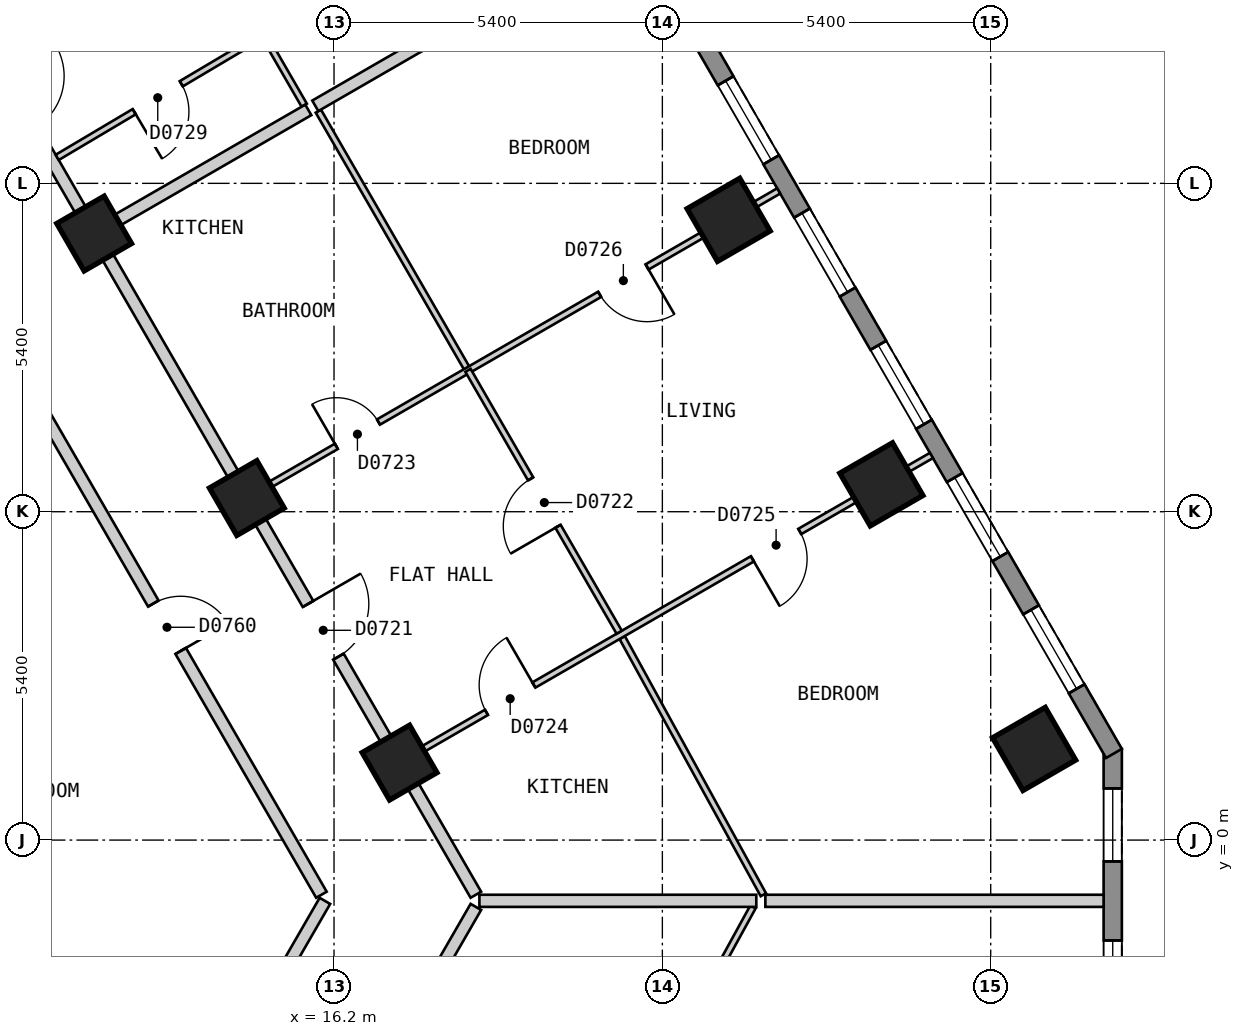
"""IFC4 building model, lengths in metres.
Left out: names, types, materials, properties, quantities, classifications, styles, units other than length and angle.
Written with IfcOpenShell. Run it as: python <this file> out.ifc"""

import sys

from ifc_helpers import new_model, si_unit, direction, frame, frame_2d, origin, origin_2d, place, context, subcontext, project, spatial, polyline, rectangle, outline, extrude, element, fill, save


model = new_model("IFC4")
c1 = context("Model", 3, precision=1e-05, world=origin(), true_north=direction((0.0, 1.0)))
c2 = subcontext(c1, "Body", "Model", "MODEL_VIEW")
j1 = project(units=[si_unit("LENGTHUNIT", "METRE"), si_unit("PLANEANGLEUNIT", "RADIAN")], contexts=[c1])
p1 = place(None, origin())
s1 = spatial("IfcSite", under=j1, at=p1, CompositionType="ELEMENT")
p2 = place(p1, origin())
s2 = spatial("IfcBuilding", under=s1, at=p2, CompositionType="ELEMENT")
p3 = place(p2, frame((0.0, 0.0, 93.0)))
s3 = spatial("IfcBuildingStorey", under=s2, at=p3, CompositionType="ELEMENT", Elevation=93.0)
for number, where, z_axis, x_axis in (
    (1, (27.714, 1.499, 0.0), (0.0, 0.0, 1.0), (-0.5, 0.866, 0.0)),
    (2, (25.202, 5.85, 0.0), (0.0, 0.0, 1.0), (-0.5, 0.866, 0.0)),
    (3, (22.69, 10.2, 0.0), (0.0, 0.0, 1.0), (-0.5, 0.866, 0.0)),
):
    element("IfcColumn", number, at=place(p3, frame(where, z_axis=z_axis, x_axis=x_axis)), inside=s3, PredefinedType="COLUMN", context=c2, shape_type="SweptSolid", body=[
        extrude(rectangle(XDim=1.0, YDim=1.0, at=origin_2d()), origin(), (0.0, 0.0, 1.0), 3.0),
    ])
for number, where, z_axis, x_axis in (
    (4, (17.278, 1.274, 0.0), (0.0, 0.0, 1.0), (-0.5, 0.866, 0.0)),
    (5, (14.766, 5.625, 0.0), (0.0, 0.0, 1.0), (-0.5, 0.866, 0.0)),
    (6, (12.255, 9.975, 0.0), (0.0, 0.0, 1.0), (-0.5, 0.866, 0.0)),
):
    element("IfcColumn", number, at=place(p3, frame(where, z_axis=z_axis, x_axis=x_axis)), inside=s3, PredefinedType="COLUMN", context=c2, shape_type="SweptSolid", body=[
        extrude(rectangle(XDim=0.9, YDim=0.9, at=origin_2d()), origin(), (0.0, 0.0, 1.0), 3.0),
    ])
p4 = place(p3, frame((29.007, -3.5, 0.0), z_axis=(0.0, 0.0, 1.0), x_axis=(0.0, 1.0, 0.0)))
e7 = element("IfcWall", 7, at=p4, inside=s3, PredefinedType="SOLIDWALL", context=c2, shape_type="SweptSolid", body=[
    extrude(outline(polyline([(0.0, -0.15), (5.0, -0.15), (4.92, 0.15), (0.08, 0.15), (0.0, -0.15)])), origin(), (0.0, 0.0, 1.0), 2.7),
])
p5 = place(p4, frame((0.65, 0.0, 0.15)))
e8 = element("IfcOpeningElement", 8, at=p5, cuts=e7, PredefinedType="OPENING", context=c2, shape_type="SweptSolid", body=[
    extrude(rectangle(XDim=1.2, YDim=2.1, at=frame_2d((0.6, 1.05))), frame((0.0, 0.16, 0.0), z_axis=(0.0, -1.0, 0.0), x_axis=(1.0, 0.0, 0.0)), (0.0, 0.0, 1.0), 0.32),
])
p6 = place(p4, frame((3.15, 0.0, 0.15)))
e9 = element("IfcOpeningElement", 9, at=p6, cuts=e7, PredefinedType="OPENING", context=c2, shape_type="SweptSolid", body=[
    extrude(rectangle(XDim=1.2, YDim=2.1, at=frame_2d((0.6, 1.05))), frame((0.0, 0.16, 0.0), z_axis=(0.0, -1.0, 0.0), x_axis=(1.0, 0.0, 0.0)), (0.0, 0.0, 1.0), 0.32),
])
p7 = place(p3, frame((29.027, 1.425, 0.0), z_axis=(0.0, 0.0, 1.0), x_axis=(-0.500027479704, 0.866009537788, 0.0)))
e10 = element("IfcWall", 10, at=p7, inside=s3, PredefinedType="SOLIDWALL", context=c2, shape_type="SweptSolid", body=[
    extrude(outline(polyline([(0.0, -0.15), (26.559, -0.15), (26.478, 0.15), (0.08, 0.15), (0.0, -0.15)])), origin(), (0.0, 0.0, 1.0), 2.7),
])
p8 = place(p7, frame((1.227, 0.0, 0.15)))
e11 = element("IfcOpeningElement", 11, at=p8, cuts=e10, PredefinedType="OPENING", context=c2, shape_type="SweptSolid", body=[
    extrude(rectangle(XDim=1.5, YDim=2.1, at=frame_2d((0.75, 1.05))), frame((0.0, 0.16, 0.0), z_axis=(0.0, -1.0, 0.0), x_axis=(1.0, 0.0, 0.0)), (0.0, 0.0, 1.0), 0.32),
])
p9 = place(p7, frame((3.738, 0.0, 0.15)))
e12 = element("IfcOpeningElement", 12, at=p9, cuts=e10, PredefinedType="OPENING", context=c2, shape_type="SweptSolid", body=[
    extrude(rectangle(XDim=1.5, YDim=2.1, at=frame_2d((0.75, 1.05))), frame((0.0, 0.16, 0.0), z_axis=(0.0, -1.0, 0.0), x_axis=(1.0, 0.0, 0.0)), (0.0, 0.0, 1.0), 0.32),
])
p10 = place(p7, frame((6.25, 0.0, 0.15)))
e13 = element("IfcOpeningElement", 13, at=p10, cuts=e10, PredefinedType="OPENING", context=c2, shape_type="SweptSolid", body=[
    extrude(rectangle(XDim=1.5, YDim=2.1, at=frame_2d((0.75, 1.05))), frame((0.0, 0.16, 0.0), z_axis=(0.0, -1.0, 0.0), x_axis=(1.0, 0.0, 0.0)), (0.0, 0.0, 1.0), 0.32),
])
p11 = place(p7, frame((8.761, 0.0, 0.15)))
e14 = element("IfcOpeningElement", 14, at=p11, cuts=e10, PredefinedType="OPENING", context=c2, shape_type="SweptSolid", body=[
    extrude(rectangle(XDim=1.5, YDim=2.1, at=frame_2d((0.75, 1.05))), frame((0.0, 0.16, 0.0), z_axis=(0.0, -1.0, 0.0), x_axis=(1.0, 0.0, 0.0)), (0.0, 0.0, 1.0), 0.32),
])
p12 = place(p7, frame((11.273, 0.0, 0.15)))
e15 = element("IfcOpeningElement", 15, at=p12, cuts=e10, PredefinedType="OPENING", context=c2, shape_type="SweptSolid", body=[
    extrude(rectangle(XDim=1.5, YDim=2.1, at=frame_2d((0.75, 1.05))), frame((0.0, 0.16, 0.0), z_axis=(0.0, -1.0, 0.0), x_axis=(1.0, 0.0, 0.0)), (0.0, 0.0, 1.0), 0.32),
])
p13 = place(p7, frame((13.785, 0.0, 0.15)))
e16 = element("IfcOpeningElement", 16, at=p13, cuts=e10, PredefinedType="OPENING", context=c2, shape_type="SweptSolid", body=[
    extrude(rectangle(XDim=1.5, YDim=2.1, at=frame_2d((0.75, 1.05))), frame((0.0, 0.16, 0.0), z_axis=(0.0, -1.0, 0.0), x_axis=(1.0, 0.0, 0.0)), (0.0, 0.0, 1.0), 0.32),
])
p14 = place(p7, frame((16.296, 0.0, 0.15)))
e17 = element("IfcOpeningElement", 17, at=p14, cuts=e10, PredefinedType="OPENING", context=c2, shape_type="SweptSolid", body=[
    extrude(rectangle(XDim=1.5, YDim=2.1, at=frame_2d((0.75, 1.05))), frame((0.0, 0.16, 0.0), z_axis=(0.0, -1.0, 0.0), x_axis=(1.0, 0.0, 0.0)), (0.0, 0.0, 1.0), 0.32),
])
p15 = place(p7, frame((18.807, 0.0, 0.15)))
e18 = element("IfcOpeningElement", 18, at=p15, cuts=e10, PredefinedType="OPENING", context=c2, shape_type="SweptSolid", body=[
    extrude(rectangle(XDim=1.5, YDim=2.1, at=frame_2d((0.75, 1.05))), frame((0.0, 0.16, 0.0), z_axis=(0.0, -1.0, 0.0), x_axis=(1.0, 0.0, 0.0)), (0.0, 0.0, 1.0), 0.32),
])
p16 = place(p7, frame((21.319, 0.0, 0.15)))
e19 = element("IfcOpeningElement", 19, at=p16, cuts=e10, PredefinedType="OPENING", context=c2, shape_type="SweptSolid", body=[
    extrude(rectangle(XDim=1.5, YDim=2.1, at=frame_2d((0.75, 1.05))), frame((0.0, 0.16, 0.0), z_axis=(0.0, -1.0, 0.0), x_axis=(1.0, 0.0, 0.0)), (0.0, 0.0, 1.0), 0.32),
])
p17 = place(p7, frame((23.831, 0.0, 0.15)))
e20 = element("IfcOpeningElement", 20, at=p17, cuts=e10, PredefinedType="OPENING", context=c2, shape_type="SweptSolid", body=[
    extrude(rectangle(XDim=1.5, YDim=2.1, at=frame_2d((0.75, 1.05))), frame((0.0, 0.16, 0.0), z_axis=(0.0, -1.0, 0.0), x_axis=(1.0, 0.0, 0.0)), (0.0, 0.0, 1.0), 0.32),
])
p18 = place(p3, frame((10.913, 7.899, 0.0), z_axis=(0.0, 0.0, 1.0), x_axis=(0.500028940566, -0.866008694296, 0.0)))
e21 = element("IfcWall", 21, at=p18, inside=s3, PredefinedType="PARTITIONING", context=c2, shape_type="SweptSolid", body=[
    extrude(rectangle(XDim=10.159, YDim=0.2, at=frame_2d((5.08, 0.0))), origin(), (0.0, 0.0, 1.0), 2.7),
])
p19 = place(p18, frame((4.63, 0.0, 0.0)))
e22 = element("IfcOpeningElement", 22, at=p19, cuts=e21, PredefinedType="OPENING", context=c2, shape_type="SweptSolid", body=[
    extrude(rectangle(XDim=0.9, YDim=2.1, at=frame_2d((0.45, 1.05))), frame((0.0, 0.11, 0.0), z_axis=(0.0, -1.0, 0.0), x_axis=(1.0, 0.0, 0.0)), (0.0, 0.0, 1.0), 0.22),
])
p20 = place(p3, frame((8.488, 16.5, 0.0), z_axis=(0.0, 0.0, 1.0), x_axis=(0.499986836607, -0.86603300354, 0.0)))
e23 = element("IfcWall", 23, at=p20, inside=s3, PredefinedType="PARTITIONING", context=c2, shape_type="SweptSolid", body=[
    extrude(rectangle(XDim=20.09, YDim=0.2, at=frame_2d((10.045, 0.0))), origin(), (0.0, 0.0, 1.0), 2.7),
])
p21 = place(p20, frame((14.569, 0.0, 0.0)))
e24 = element("IfcOpeningElement", 24, at=p21, cuts=e23, PredefinedType="OPENING", context=c2, shape_type="SweptSolid", body=[
    extrude(rectangle(XDim=1.0, YDim=2.1, at=frame_2d((0.5, 1.05))), frame((0.0, 0.11, 0.0), z_axis=(0.0, -1.0, 0.0), x_axis=(1.0, 0.0, 0.0)), (0.0, 0.0, 1.0), 0.22),
])
p22 = place(p20, frame((4.547, 0.0, 0.0)))
e25 = element("IfcOpeningElement", 25, at=p22, cuts=e23, PredefinedType="OPENING", context=c2, shape_type="SweptSolid", body=[
    extrude(rectangle(XDim=1.0, YDim=2.1, at=frame_2d((0.5, 1.05))), frame((0.0, 0.11, 0.0), z_axis=(0.0, -1.0, 0.0), x_axis=(1.0, 0.0, 0.0)), (0.0, 0.0, 1.0), 0.22),
])
p23 = place(p3, frame((15.011, -2.8, 0.0), z_axis=(0.0, 0.0, 1.0), x_axis=(0.499929208183, 0.866066271601, 0.0)))
e26 = element("IfcWall", 26, at=p23, inside=s3, PredefinedType="PARTITIONING", context=c2, shape_type="SweptSolid", body=[
    extrude(rectangle(XDim=2.078, YDim=0.2, at=frame_2d((1.039, 0.0))), origin(), (0.0, 0.0, 1.0), 2.7),
])
p24 = place(p3, frame((15.771, -5.884, 0.0), z_axis=(0.0, 0.0, 1.0), x_axis=(0.499917542299, 0.866073005526, 0.0)))
e27 = element("IfcWall", 27, at=p24, inside=s3, PredefinedType="PARTITIONING", context=c2, shape_type="SweptSolid", body=[
    extrude(rectangle(XDim=5.525, YDim=0.2, at=frame_2d((2.762, 0.0))), origin(), (0.0, 0.0, 1.0), 2.7),
])
p25 = place(p3, frame((13.273, 16.305, 0.0), z_axis=(0.0, 0.0, 1.0), x_axis=(0.500093956194, -0.865971151354, 0.0)))
e28 = element("IfcWall", 28, at=p25, inside=s3, PredefinedType="PARTITIONING", context=c2, shape_type="SweptSolid", body=[
    extrude(rectangle(XDim=4.873, YDim=0.1, at=frame_2d((2.437, 0.0))), origin(), (0.0, 0.0, 1.0), 2.7),
])
p26 = place(p25, frame((1.987, 0.0, 0.0)))
e29 = element("IfcOpeningElement", 29, at=p26, cuts=e28, PredefinedType="OPENING", context=c2, shape_type="SweptSolid", body=[
    extrude(rectangle(XDim=0.9, YDim=2.1, at=frame_2d((0.45, 1.05))), frame((0.0, 0.06, 0.0), z_axis=(0.0, -1.0, 0.0), x_axis=(1.0, 0.0, 0.0)), (0.0, 0.0, 1.0), 0.12),
])
p27 = place(p3, frame((15.942, 11.988, 0.0), z_axis=(0.0, 0.0, 1.0), x_axis=(0.499995794706, -0.866027831699, 0.0)))
e30 = element("IfcWall", 30, at=p27, inside=s3, PredefinedType="PARTITIONING", context=c2, shape_type="SweptSolid", body=[
    extrude(rectangle(XDim=4.922, YDim=0.1, at=frame_2d((2.461, 0.0))), origin(), (0.0, 0.0, 1.0), 2.7),
])
p28 = place(p3, frame((20.939, 3.331, 0.0), z_axis=(0.0, 0.0, 1.0), x_axis=(0.481207738216, -0.876606589458, 0.0)))
e31 = element("IfcWall", 31, at=p28, inside=s3, PredefinedType="PARTITIONING", context=c2, shape_type="SweptSolid", body=[
    extrude(rectangle(XDim=4.825, YDim=0.1, at=frame_2d((2.413, 0.0))), origin(), (0.0, 0.0, 1.0), 2.7),
])
p29 = place(p3, frame((20.812, -5.248, 0.0), z_axis=(0.0, 0.0, 1.0), x_axis=(0.481296891345, 0.876557643502, 0.0)))
e32 = element("IfcWall", 32, at=p29, inside=s3, PredefinedType="PARTITIONING", context=c2, shape_type="SweptSolid", body=[
    extrude(rectangle(XDim=4.733, YDim=0.1, at=frame_2d((2.367, 0.0))), origin(), (0.0, 0.0, 1.0), 2.7),
])
p30 = place(p3, frame((17.365, 1.325, 0.0), z_axis=(0.0, 0.0, 1.0), x_axis=(0.866016855193, 0.500014806302, 0.0)))
e33 = element("IfcWall", 33, at=p30, inside=s3, PredefinedType="PARTITIONING", context=c2, shape_type="SweptSolid", body=[
    extrude(rectangle(XDim=10.0, YDim=0.1, at=frame_2d((5.0, 0.0))), origin(), (0.0, 0.0, 1.0), 2.7),
])
p31 = place(p30, frame((1.55, 0.0, 0.0)))
e34 = element("IfcOpeningElement", 34, at=p31, cuts=e33, PredefinedType="OPENING", context=c2, shape_type="SweptSolid", body=[
    extrude(rectangle(XDim=0.9, YDim=2.1, at=frame_2d((0.45, 1.05))), frame((0.0, 0.06, 0.0), z_axis=(0.0, -1.0, 0.0), x_axis=(1.0, 0.0, 0.0)), (0.0, 0.0, 1.0), 0.12),
])
p32 = place(p30, frame((6.6, 0.0, 0.0)))
e35 = element("IfcOpeningElement", 35, at=p32, cuts=e33, PredefinedType="OPENING", context=c2, shape_type="SweptSolid", body=[
    extrude(rectangle(XDim=0.9, YDim=2.1, at=frame_2d((0.45, 1.05))), frame((0.0, 0.06, 0.0), z_axis=(0.0, -1.0, 0.0), x_axis=(1.0, 0.0, 0.0)), (0.0, 0.0, 1.0), 0.12),
])
p33 = place(p3, frame((14.853, 5.675, 0.0), z_axis=(0.0, 0.0, 1.0), x_axis=(0.866016855193, 0.500014806302, 0.0)))
e36 = element("IfcWall", 36, at=p33, inside=s3, PredefinedType="PARTITIONING", context=c2, shape_type="SweptSolid", body=[
    extrude(rectangle(XDim=10.0, YDim=0.1, at=frame_2d((5.0, 0.0))), origin(), (0.0, 0.0, 1.0), 2.7),
])
p34 = place(p33, frame((1.6, 0.0, 0.0)))
e37 = element("IfcOpeningElement", 37, at=p34, cuts=e36, PredefinedType="OPENING", context=c2, shape_type="SweptSolid", body=[
    extrude(rectangle(XDim=0.8, YDim=2.1, at=frame_2d((0.4, 1.05))), frame((0.0, 0.06, 0.0), z_axis=(0.0, -1.0, 0.0), x_axis=(1.0, 0.0, 0.0)), (0.0, 0.0, 1.0), 0.12),
])
p35 = place(p33, frame((6.6, 0.0, 0.0)))
e38 = element("IfcOpeningElement", 38, at=p35, cuts=e36, PredefinedType="OPENING", context=c2, shape_type="SweptSolid", body=[
    extrude(rectangle(XDim=0.9, YDim=2.1, at=frame_2d((0.45, 1.05))), frame((0.0, 0.06, 0.0), z_axis=(0.0, -1.0, 0.0), x_axis=(1.0, 0.0, 0.0)), (0.0, 0.0, 1.0), 0.12),
])
p36 = place(p3, frame((11.647, 11.227, 0.0), z_axis=(0.0, 0.0, 1.0), x_axis=(0.859997349349, 0.510298500011, 0.0)))
e39 = element("IfcWall", 39, at=p36, inside=s3, PredefinedType="PARTITIONING", context=c2, shape_type="SweptSolid", body=[
    extrude(rectangle(XDim=3.898, YDim=0.1, at=frame_2d((1.949, 0.0))), origin(), (0.0, 0.0, 1.0), 2.7),
])
p37 = place(p36, frame((1.473, 0.0, 0.0)))
e40 = element("IfcOpeningElement", 40, at=p37, cuts=e39, PredefinedType="OPENING", context=c2, shape_type="SweptSolid", body=[
    extrude(rectangle(XDim=0.9, YDim=2.1, at=frame_2d((0.45, 1.05))), frame((0.0, 0.06, 0.0), z_axis=(0.0, -1.0, 0.0), x_axis=(1.0, 0.0, 0.0)), (0.0, 0.0, 1.0), 0.12),
])
p38 = place(p3, frame((18.591, -0.999, 0.0), z_axis=(0.0, 0.0, 1.0), x_axis=(1.0, 0.0, 0.0)))
e41 = element("IfcWall", 41, at=p38, inside=s3, PredefinedType="PARTITIONING", context=c2, shape_type="SweptSolid", body=[
    extrude(rectangle(XDim=4.554, YDim=0.2, at=frame_2d((2.277, 0.0))), origin(), (0.0, 0.0, 1.0), 2.7),
])
p39 = place(p3, frame((23.294, -0.999, 0.0), z_axis=(0.0, 0.0, 1.0), x_axis=(1.0, 0.0, 0.0)))
e42 = element("IfcWall", 42, at=p39, inside=s3, PredefinedType="PARTITIONING", context=c2, shape_type="SweptSolid", body=[
    extrude(rectangle(XDim=5.563, YDim=0.2, at=frame_2d((2.781, 0.0))), origin(), (0.0, 0.0, 1.0), 2.7),
])
p40 = place(p3, frame((12.342, 10.025, 0.0), z_axis=(0.0, 0.0, 1.0), x_axis=(0.866033886885, 0.499985306551, 0.0)))
e43 = element("IfcWall", 43, at=p40, inside=s3, PredefinedType="PARTITIONING", context=c2, shape_type="SweptSolid", body=[
    extrude(rectangle(XDim=3.966, YDim=0.2, at=frame_2d((1.983, 0.0))), origin(), (0.0, 0.0, 1.0), 2.7),
])
p41 = place(p3, frame((15.892, 12.075, 0.0), z_axis=(0.0, 0.0, 1.0), x_axis=(0.866000883696, 0.500042467634, 0.0)))
e44 = element("IfcWall", 44, at=p41, inside=s3, PredefinedType="PARTITIONING", context=c2, shape_type="SweptSolid", body=[
    extrude(rectangle(XDim=5.899, YDim=0.2, at=frame_2d((2.95, 0.0))), origin(), (0.0, 0.0, 1.0), 2.7),
])
p42 = place(p3, frame((18.403, 7.725, 0.0), z_axis=(0.0, 0.0, 1.0), x_axis=(0.500014231302, -0.866017187182, 0.0)))
e45 = element("IfcWall", 45, at=p42, inside=s3, PredefinedType="PARTITIONING", context=c2, shape_type="SweptSolid", body=[
    extrude(rectangle(XDim=4.973, YDim=0.1, at=frame_2d((2.487, 0.0))), origin(), (0.0, 0.0, 1.0), 2.7),
])
p43 = place(p42, frame((2.061, 0.0, 0.0)))
e46 = element("IfcOpeningElement", 46, at=p43, cuts=e45, PredefinedType="OPENING", context=c2, shape_type="SweptSolid", body=[
    extrude(rectangle(XDim=0.9, YDim=2.1, at=frame_2d((0.45, 1.05))), frame((0.0, 0.06, 0.0), z_axis=(0.0, -1.0, 0.0), x_axis=(1.0, 0.0, 0.0)), (0.0, 0.0, 1.0), 0.12),
])
p44 = place(p5, origin())
e47 = element("IfcWindow", 47, at=p44, inside=s3, PartitioningType="SINGLE_PANEL", PredefinedType="WINDOW", context=c2, shape_type="SweptSolid", body=[
    extrude(rectangle(XDim=1.2, YDim=2.1, at=frame_2d((0.6, 1.05))), frame((0.0, 0.03, 0.0), z_axis=(0.0, -1.0, 0.0), x_axis=(1.0, 0.0, 0.0)), (0.0, 0.0, 1.0), 0.06),
])
fill(e8, e47)
p45 = place(p6, origin())
e48 = element("IfcWindow", 48, at=p45, inside=s3, PartitioningType="SINGLE_PANEL", PredefinedType="WINDOW", context=c2, shape_type="SweptSolid", body=[
    extrude(rectangle(XDim=1.2, YDim=2.1, at=frame_2d((0.6, 1.05))), frame((0.0, 0.03, 0.0), z_axis=(0.0, -1.0, 0.0), x_axis=(1.0, 0.0, 0.0)), (0.0, 0.0, 1.0), 0.06),
])
fill(e9, e48)
p46 = place(p8, origin())
e49 = element("IfcWindow", 49, at=p46, inside=s3, PartitioningType="SINGLE_PANEL", PredefinedType="WINDOW", context=c2, shape_type="SweptSolid", body=[
    extrude(rectangle(XDim=1.5, YDim=2.1, at=frame_2d((0.75, 1.05))), frame((0.0, 0.03, 0.0), z_axis=(0.0, -1.0, 0.0), x_axis=(1.0, 0.0, 0.0)), (0.0, 0.0, 1.0), 0.06),
])
fill(e11, e49)
p47 = place(p9, origin())
e50 = element("IfcWindow", 50, at=p47, inside=s3, PartitioningType="SINGLE_PANEL", PredefinedType="WINDOW", context=c2, shape_type="SweptSolid", body=[
    extrude(rectangle(XDim=1.5, YDim=2.1, at=frame_2d((0.75, 1.05))), frame((0.0, 0.03, 0.0), z_axis=(0.0, -1.0, 0.0), x_axis=(1.0, 0.0, 0.0)), (0.0, 0.0, 1.0), 0.06),
])
fill(e12, e50)
p48 = place(p10, origin())
e51 = element("IfcWindow", 51, at=p48, inside=s3, PartitioningType="SINGLE_PANEL", PredefinedType="WINDOW", context=c2, shape_type="SweptSolid", body=[
    extrude(rectangle(XDim=1.5, YDim=2.1, at=frame_2d((0.75, 1.05))), frame((0.0, 0.03, 0.0), z_axis=(0.0, -1.0, 0.0), x_axis=(1.0, 0.0, 0.0)), (0.0, 0.0, 1.0), 0.06),
])
fill(e13, e51)
p49 = place(p11, origin())
e52 = element("IfcWindow", 52, at=p49, inside=s3, PartitioningType="SINGLE_PANEL", PredefinedType="WINDOW", context=c2, shape_type="SweptSolid", body=[
    extrude(rectangle(XDim=1.5, YDim=2.1, at=frame_2d((0.75, 1.05))), frame((0.0, 0.03, 0.0), z_axis=(0.0, -1.0, 0.0), x_axis=(1.0, 0.0, 0.0)), (0.0, 0.0, 1.0), 0.06),
])
fill(e14, e52)
p50 = place(p12, origin())
e53 = element("IfcWindow", 53, at=p50, inside=s3, PartitioningType="SINGLE_PANEL", PredefinedType="WINDOW", context=c2, shape_type="SweptSolid", body=[
    extrude(rectangle(XDim=1.5, YDim=2.1, at=frame_2d((0.75, 1.05))), frame((0.0, 0.03, 0.0), z_axis=(0.0, -1.0, 0.0), x_axis=(1.0, 0.0, 0.0)), (0.0, 0.0, 1.0), 0.06),
])
fill(e15, e53)
p51 = place(p21, origin())
e54 = element("IfcDoor", 54, at=p51, inside=s3, OperationType="SINGLE_SWING_LEFT", PredefinedType="DOOR", context=c2, shape_type="SweptSolid", body=[
    extrude(rectangle(XDim=1.0, YDim=2.1, at=frame_2d((0.5, 1.05))), frame((0.0, 0.025, 0.0), z_axis=(0.0, -1.0, 0.0), x_axis=(1.0, 0.0, 0.0)), (0.0, 0.0, 1.0), 0.05),
])
fill(e24, e54)
p52 = place(p43, origin())
e55 = element("IfcDoor", 55, at=p52, inside=s3, OperationType="SINGLE_SWING_RIGHT", PredefinedType="DOOR", context=c2, shape_type="SweptSolid", body=[
    extrude(rectangle(XDim=0.9, YDim=2.1, at=frame_2d((0.45, 1.05))), frame((0.0, 0.025, 0.0), z_axis=(0.0, -1.0, 0.0), x_axis=(1.0, 0.0, 0.0)), (0.0, 0.0, 1.0), 0.05),
])
fill(e46, e55)
p53 = place(p34, origin())
e56 = element("IfcDoor", 56, at=p53, inside=s3, OperationType="SINGLE_SWING_LEFT", PredefinedType="DOOR", context=c2, shape_type="SweptSolid", body=[
    extrude(rectangle(XDim=0.8, YDim=2.1, at=frame_2d((0.4, 1.05))), frame((0.0, 0.025, 0.0), z_axis=(0.0, -1.0, 0.0), x_axis=(1.0, 0.0, 0.0)), (0.0, 0.0, 1.0), 0.05),
])
fill(e37, e56)
p54 = place(p31, origin())
e57 = element("IfcDoor", 57, at=p54, inside=s3, OperationType="SINGLE_SWING_RIGHT", PredefinedType="DOOR", context=c2, shape_type="SweptSolid", body=[
    extrude(rectangle(XDim=0.9, YDim=2.1, at=frame_2d((0.45, 1.05))), frame((0.0, 0.025, 0.0), z_axis=(0.0, -1.0, 0.0), x_axis=(1.0, 0.0, 0.0)), (0.0, 0.0, 1.0), 0.05),
])
fill(e34, e57)
p55 = place(p32, origin())
e58 = element("IfcDoor", 58, at=p55, inside=s3, OperationType="SINGLE_SWING_LEFT", PredefinedType="DOOR", context=c2, shape_type="SweptSolid", body=[
    extrude(rectangle(XDim=0.9, YDim=2.1, at=frame_2d((0.45, 1.05))), frame((0.0, 0.025, 0.0), z_axis=(0.0, -1.0, 0.0), x_axis=(1.0, 0.0, 0.0)), (0.0, 0.0, 1.0), 0.05),
])
fill(e35, e58)
p56 = place(p35, origin())
e59 = element("IfcDoor", 59, at=p56, inside=s3, OperationType="SINGLE_SWING_RIGHT", PredefinedType="DOOR", context=c2, shape_type="SweptSolid", body=[
    extrude(rectangle(XDim=0.9, YDim=2.1, at=frame_2d((0.45, 1.05))), frame((0.0, 0.025, 0.0), z_axis=(0.0, -1.0, 0.0), x_axis=(1.0, 0.0, 0.0)), (0.0, 0.0, 1.0), 0.05),
])
fill(e38, e59)
p57 = place(p37, origin())
e60 = element("IfcDoor", 60, at=p57, inside=s3, OperationType="SINGLE_SWING_LEFT", PredefinedType="DOOR", context=c2, shape_type="SweptSolid", body=[
    extrude(rectangle(XDim=0.9, YDim=2.1, at=frame_2d((0.45, 1.05))), frame((0.0, 0.025, 0.0), z_axis=(0.0, -1.0, 0.0), x_axis=(1.0, 0.0, 0.0)), (0.0, 0.0, 1.0), 0.05),
])
fill(e40, e60)
p58 = place(p19, origin())
e61 = element("IfcDoor", 61, at=p58, inside=s3, OperationType="SINGLE_SWING_RIGHT", PredefinedType="DOOR", context=c2, shape_type="SweptSolid", body=[
    extrude(rectangle(XDim=0.9, YDim=2.1, at=frame_2d((0.45, 1.05))), frame((0.0, 0.025, 0.0), z_axis=(0.0, -1.0, 0.0), x_axis=(1.0, 0.0, 0.0)), (0.0, 0.0, 1.0), 0.05),
])
fill(e22, e61)
save(model, sys.argv[1])
